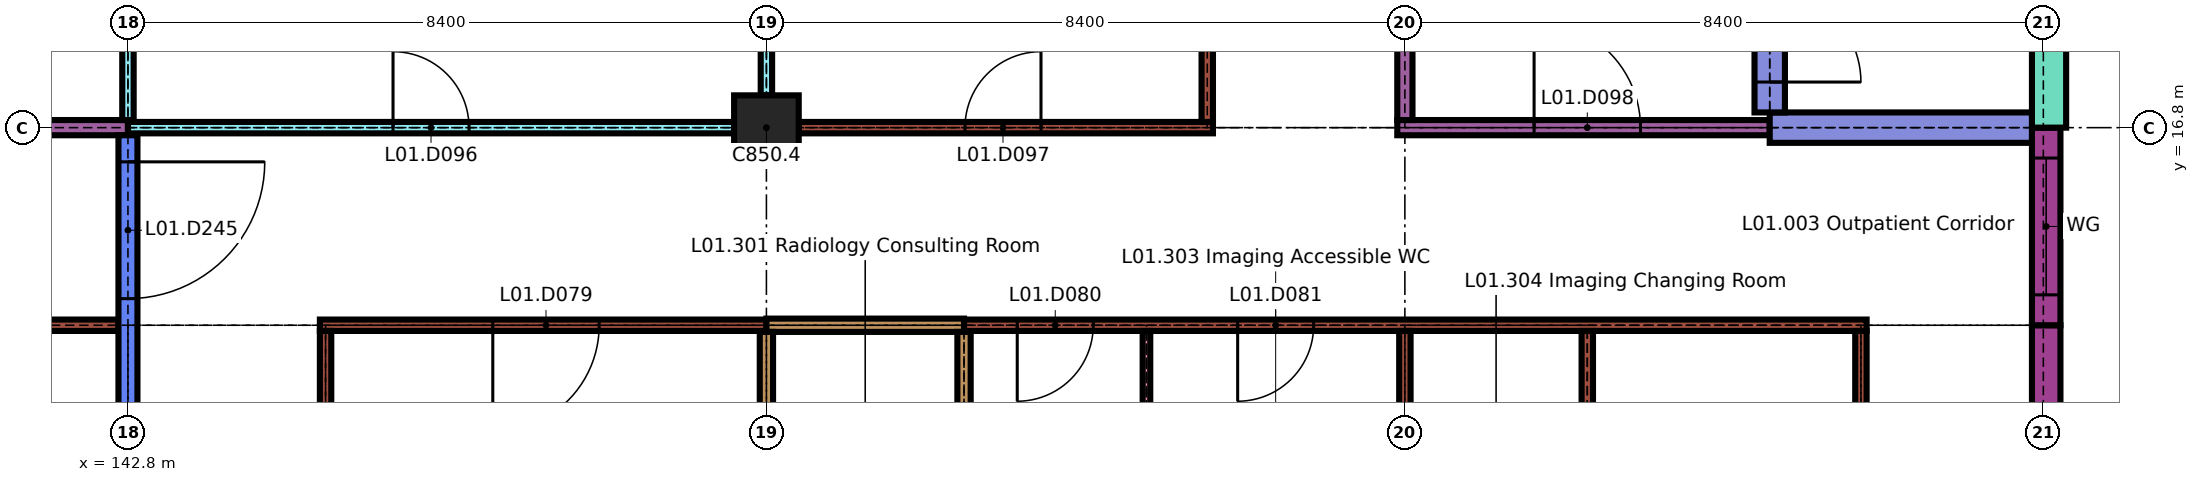
"""IFC4 building model, lengths in metres.
Left out: names, types, materials, properties, quantities, classifications, styles, units other than length and angle.
Written with IfcOpenShell. Run it as: python <this file> out.ifc"""

import sys

from ifc_helpers import new_model, si_unit, direction, frame, frame_2d, origin, origin_2d, place, context, subcontext, project, spatial, rectangle, extrude, element, fill, save


model = new_model("IFC4")
c1 = context("Model", 3, precision=1e-05, world=origin(), true_north=direction((0.0, 1.0)))
c2 = subcontext(c1, "Body", "Model", "MODEL_VIEW")
j1 = project(units=[si_unit("LENGTHUNIT", "METRE"), si_unit("PLANEANGLEUNIT", "RADIAN")], contexts=[c1])
p1 = place(None, origin())
s1 = spatial("IfcSite", under=j1, at=p1, CompositionType="ELEMENT")
p2 = place(p1, origin())
s2 = spatial("IfcBuilding", under=s1, at=p2, CompositionType="ELEMENT")
p3 = place(p2, frame((0.0, 0.0, 4.5)))
s3 = spatial("IfcBuildingStorey", under=s2, at=p3, CompositionType="ELEMENT", Elevation=4.5)
p4 = place(p3, frame((151.2, 16.8, 0.0), z_axis=(0.0, 0.0, 1.0), x_axis=(1.0, 0.0, 0.0)))
e1 = element("IfcColumn", 1, at=p4, inside=s3, PredefinedType="COLUMN", context=c2, shape_type="SweptSolid", body=[
    extrude(rectangle(XDim=0.85, YDim=0.85, at=origin_2d()), origin(), (0.0, 0.0, 1.0), 3.45),
])
p5 = place(p3, frame((168.038, 12.8, 0.0), z_axis=(0.0, 0.0, 1.0), x_axis=(0.0, 1.0, 0.0)))
e2 = element("IfcWall", 2, at=p5, inside=s3, PredefinedType="SOLIDWALL", context=c2, shape_type="SweptSolid", body=[
    extrude(rectangle(XDim=1.4, YDim=0.375, at=frame_2d((0.7, 0.0))), origin(), (0.0, 0.0, 1.0), 3.15),
])
p6 = place(p3, frame((168.038, 14.2, 0.0), z_axis=(0.0, 0.0, 1.0), x_axis=(0.0, 1.0, 0.0)))
e3 = element("IfcWall", 3, at=p6, inside=s3, PredefinedType="SOLIDWALL", context=c2, shape_type="SweptSolid", body=[
    extrude(rectangle(XDim=2.6, YDim=0.375, at=frame_2d((1.3, 0.0))), origin(), (0.0, 0.0, 1.0), 3.15),
])
p7 = place(p6, frame((0.4, 0.0, 0.9)))
e4 = element("IfcOpeningElement", 4, at=p7, cuts=e3, PredefinedType="OPENING", context=c2, shape_type="SweptSolid", body=[
    extrude(rectangle(XDim=1.8, YDim=1.5, at=frame_2d((0.9, 0.75))), frame((0.0, 0.198, 0.0), z_axis=(0.0, -1.0, 0.0), x_axis=(1.0, 0.0, 0.0)), (0.0, 0.0, 1.0), 0.395),
])
p8 = place(p3, frame((168.075, 16.8, 0.0), z_axis=(0.0, 0.0, 1.0), x_axis=(0.0, 1.0, 0.0)))
e5 = element("IfcWall", 5, at=p8, inside=s3, PredefinedType="SOLIDWALL", context=c2, shape_type="SweptSolid", body=[
    extrude(rectangle(XDim=3.15, YDim=0.45, at=frame_2d((1.575, 0.0))), origin(), (0.0, 0.0, 1.0), 3.45),
])
p9 = place(p3, frame((131.4, 14.2, 0.0), z_axis=(0.0, 0.0, 1.0), x_axis=(1.0, 0.0, 0.0)))
e6 = element("IfcWall", 6, at=p9, inside=s3, PredefinedType="PARTITIONING", context=c2, shape_type="SweptSolid", body=[
    extrude(rectangle(XDim=11.275, YDim=0.15, at=frame_2d((5.638, 0.0))), origin(), (0.0, 0.0, 1.0), 3.45),
])
p10 = place(p9, frame((1.0, 0.0, 0.0)))
e7 = element("IfcOpeningElement", 7, at=p10, cuts=e6, PredefinedType="OPENING", context=c2, shape_type="SweptSolid", body=[
    extrude(rectangle(XDim=1.0, YDim=2.1, at=frame_2d((0.5, 1.05))), frame((0.0, 0.085, 0.0), z_axis=(0.0, -1.0, 0.0), x_axis=(1.0, 0.0, 0.0)), (0.0, 0.0, 1.0), 0.17),
])
p11 = place(p9, frame((6.438, 0.0, 0.0)))
e8 = element("IfcOpeningElement", 8, at=p11, cuts=e6, PredefinedType="OPENING", context=c2, shape_type="SweptSolid", body=[
    extrude(rectangle(XDim=1.4, YDim=2.1, at=frame_2d((0.7, 1.05))), frame((0.0, 0.085, 0.0), z_axis=(0.0, -1.0, 0.0), x_axis=(1.0, 0.0, 0.0)), (0.0, 0.0, 1.0), 0.17),
])
p12 = place(p3, frame((145.325, 14.2, 0.0), z_axis=(0.0, 0.0, 1.0), x_axis=(1.0, 0.0, 0.0)))
e9 = element("IfcWall", 9, at=p12, inside=s3, PredefinedType="PARTITIONING", context=c2, shape_type="SweptSolid", body=[
    extrude(rectangle(XDim=5.875, YDim=0.15, at=frame_2d((2.938, 0.0))), origin(), (0.0, 0.0, 1.0), 3.45),
])
p13 = place(p12, frame((2.275, 0.0, 0.0)))
e10 = element("IfcOpeningElement", 10, at=p13, cuts=e9, PredefinedType="OPENING", context=c2, shape_type="SweptSolid", body=[
    extrude(rectangle(XDim=1.4, YDim=2.1, at=frame_2d((0.7, 1.05))), frame((0.0, 0.085, 0.0), z_axis=(0.0, -1.0, 0.0), x_axis=(1.0, 0.0, 0.0)), (0.0, 0.0, 1.0), 0.17),
])
p14 = place(p3, frame((151.2, 14.2, 0.0), z_axis=(0.0, 0.0, 1.0), x_axis=(1.0, 0.0, 0.0)))
e11 = element("IfcWall", 11, at=p14, inside=s3, PredefinedType="PARTITIONING", context=c2, shape_type="SweptSolid", body=[
    extrude(rectangle(XDim=2.6, YDim=0.175, at=frame_2d((1.3, 0.0))), origin(), (0.0, 0.0, 1.0), 3.45),
])
p15 = place(p3, frame((153.8, 14.2, 0.0), z_axis=(0.0, 0.0, 1.0), x_axis=(1.0, 0.0, 0.0)))
e12 = element("IfcWall", 12, at=p15, inside=s3, PredefinedType="PARTITIONING", context=c2, shape_type="SweptSolid", body=[
    extrude(rectangle(XDim=11.875, YDim=0.15, at=frame_2d((5.938, 0.0))), origin(), (0.0, 0.0, 1.0), 3.45),
])
p16 = place(p15, frame((0.7, 0.0, 0.0)))
e13 = element("IfcOpeningElement", 13, at=p16, cuts=e12, PredefinedType="OPENING", context=c2, shape_type="SweptSolid", body=[
    extrude(rectangle(XDim=1.0, YDim=2.1, at=frame_2d((0.5, 1.05))), frame((0.0, 0.085, 0.0), z_axis=(0.0, -1.0, 0.0), x_axis=(1.0, 0.0, 0.0)), (0.0, 0.0, 1.0), 0.17),
])
p17 = place(p15, frame((3.6, 0.0, 0.0)))
e14 = element("IfcOpeningElement", 14, at=p17, cuts=e12, PredefinedType="OPENING", context=c2, shape_type="SweptSolid", body=[
    extrude(rectangle(XDim=1.0, YDim=2.1, at=frame_2d((0.5, 1.05))), frame((0.0, 0.085, 0.0), z_axis=(0.0, -1.0, 0.0), x_axis=(1.0, 0.0, 0.0)), (0.0, 0.0, 1.0), 0.17),
])
p18 = place(p3, frame((117.6, 16.8, 0.0), z_axis=(0.0, 0.0, 1.0), x_axis=(1.0, 0.0, 0.0)))
e15 = element("IfcWall", 15, at=p18, inside=s3, PredefinedType="PARTITIONING", context=c2, shape_type="SweptSolid", body=[
    extrude(rectangle(XDim=25.2, YDim=0.2, at=frame_2d((12.6, 0.0))), origin(), (0.0, 0.0, 1.0), 3.45),
])
p19 = place(p18, frame((3.3, 0.0, 0.0)))
e16 = element("IfcOpeningElement", 16, at=p19, cuts=e15, PredefinedType="OPENING", context=c2, shape_type="SweptSolid", body=[
    extrude(rectangle(XDim=1.8, YDim=2.4, at=frame_2d((0.9, 1.2))), frame((0.0, 0.11, 0.0), z_axis=(0.0, -1.0, 0.0), x_axis=(1.0, 0.0, 0.0)), (0.0, 0.0, 1.0), 0.22),
])
p20 = place(p18, frame((15.9, 0.0, 0.0)))
e17 = element("IfcOpeningElement", 17, at=p20, cuts=e15, PredefinedType="OPENING", context=c2, shape_type="SweptSolid", body=[
    extrude(rectangle(XDim=1.8, YDim=2.4, at=frame_2d((0.9, 1.2))), frame((0.0, 0.11, 0.0), z_axis=(0.0, -1.0, 0.0), x_axis=(1.0, 0.0, 0.0)), (0.0, 0.0, 1.0), 0.22),
])
p21 = place(p3, frame((142.8, 16.8, 0.0), z_axis=(0.0, 0.0, 1.0), x_axis=(1.0, 0.0, 0.0)))
e18 = element("IfcWall", 18, at=p21, inside=s3, PredefinedType="PARTITIONING", context=c2, shape_type="SweptSolid", body=[
    extrude(rectangle(XDim=7.975, YDim=0.15, at=frame_2d((3.987, 0.0))), origin(), (0.0, 0.0, 1.0), 3.45),
])
p22 = place(p21, frame((3.488, 0.0, 0.0)))
e19 = element("IfcOpeningElement", 19, at=p22, cuts=e18, PredefinedType="OPENING", context=c2, shape_type="SweptSolid", body=[
    extrude(rectangle(XDim=1.0, YDim=2.1, at=frame_2d((0.5, 1.05))), frame((0.0, 0.085, 0.0), z_axis=(0.0, -1.0, 0.0), x_axis=(1.0, 0.0, 0.0)), (0.0, 0.0, 1.0), 0.17),
])
p23 = place(p3, frame((151.625, 16.8, 0.0), z_axis=(0.0, 0.0, 1.0), x_axis=(1.0, 0.0, 0.0)))
e20 = element("IfcWall", 20, at=p23, inside=s3, PredefinedType="PARTITIONING", context=c2, shape_type="SweptSolid", body=[
    extrude(rectangle(XDim=5.45, YDim=0.15, at=frame_2d((2.725, 0.0))), origin(), (0.0, 0.0, 1.0), 3.45),
])
p24 = place(p23, frame((2.188, 0.0, 0.0)))
e21 = element("IfcOpeningElement", 21, at=p24, cuts=e20, PredefinedType="OPENING", context=c2, shape_type="SweptSolid", body=[
    extrude(rectangle(XDim=1.0, YDim=2.1, at=frame_2d((0.5, 1.05))), frame((0.0, 0.085, 0.0), z_axis=(0.0, -1.0, 0.0), x_axis=(1.0, 0.0, 0.0)), (0.0, 0.0, 1.0), 0.17),
])
p25 = place(p3, frame((159.5, 16.8, 0.0), z_axis=(0.0, 0.0, 1.0), x_axis=(1.0, 0.0, 0.0)))
e22 = element("IfcWall", 22, at=p25, inside=s3, PredefinedType="PARTITIONING", context=c2, shape_type="SweptSolid", body=[
    extrude(rectangle(XDim=4.9, YDim=0.2, at=frame_2d((2.45, 0.0))), origin(), (0.0, 0.0, 1.0), 3.45),
])
p26 = place(p25, frame((1.8, 0.0, 0.0)))
e23 = element("IfcOpeningElement", 23, at=p26, cuts=e22, PredefinedType="OPENING", context=c2, shape_type="SweptSolid", body=[
    extrude(rectangle(XDim=1.4, YDim=2.1, at=frame_2d((0.7, 1.05))), frame((0.0, 0.11, 0.0), z_axis=(0.0, -1.0, 0.0), x_axis=(1.0, 0.0, 0.0)), (0.0, 0.0, 1.0), 0.22),
])
p27 = place(p3, frame((164.4, 16.8, 0.0), z_axis=(0.0, 0.0, 1.0), x_axis=(1.0, 0.0, 0.0)))
e24 = element("IfcWall", 24, at=p27, inside=s3, PredefinedType="SHEAR", context=c2, shape_type="SweptSolid", body=[
    extrude(rectangle(XDim=3.45, YDim=0.4, at=frame_2d((1.725, 0.0))), origin(), (0.0, 0.0, 1.0), 3.45),
])
p28 = place(p3, frame((142.8, 6.0, 0.0), z_axis=(0.0, 0.0, 1.0), x_axis=(0.0, 1.0, 0.0)))
e25 = element("IfcWall", 25, at=p28, inside=s3, PredefinedType="SOLIDWALL", context=c2, shape_type="SweptSolid", body=[
    extrude(rectangle(XDim=10.7, YDim=0.25, at=frame_2d((5.35, 0.0))), origin(), (0.0, 0.0, 1.0), 3.45),
])
p29 = place(p28, frame((0.5, 0.0, 0.0)))
e26 = element("IfcOpeningElement", 26, at=p29, cuts=e25, PredefinedType="OPENING", context=c2, shape_type="SweptSolid", body=[
    extrude(rectangle(XDim=1.4, YDim=2.1, at=frame_2d((0.7, 1.05))), frame((0.0, 0.135, 0.0), z_axis=(0.0, -1.0, 0.0), x_axis=(1.0, 0.0, 0.0)), (0.0, 0.0, 1.0), 0.27),
])
p30 = place(p28, frame((8.55, 0.0, 0.0)))
e27 = element("IfcOpeningElement", 27, at=p30, cuts=e25, PredefinedType="OPENING", context=c2, shape_type="SweptSolid", body=[
    extrude(rectangle(XDim=1.8, YDim=2.4, at=frame_2d((0.9, 1.2))), frame((0.0, 0.135, 0.0), z_axis=(0.0, -1.0, 0.0), x_axis=(1.0, 0.0, 0.0)), (0.0, 0.0, 1.0), 0.27),
])
p31 = place(p3, frame((142.8, 16.9, 0.0), z_axis=(0.0, 0.0, 1.0), x_axis=(0.0, 1.0, 0.0)))
e28 = element("IfcWall", 28, at=p31, inside=s3, PredefinedType="PARTITIONING", context=c2, shape_type="SweptSolid", body=[
    extrude(rectangle(XDim=4.7, YDim=0.15, at=frame_2d((2.35, 0.0))), origin(), (0.0, 0.0, 1.0), 3.45),
])
p32 = place(p3, frame((145.4, 8.675, 0.0), z_axis=(0.0, 0.0, 1.0), x_axis=(0.0, 1.0, 0.0)))
e29 = element("IfcWall", 29, at=p32, inside=s3, PredefinedType="PARTITIONING", context=c2, shape_type="SweptSolid", body=[
    extrude(rectangle(XDim=5.45, YDim=0.15, at=frame_2d((2.725, 0.0))), origin(), (0.0, 0.0, 1.0), 3.45),
])
p33 = place(p3, frame((151.2, 8.825, 0.0), z_axis=(0.0, 0.0, 1.0), x_axis=(0.0, 1.0, 0.0)))
e30 = element("IfcWall", 30, at=p33, inside=s3, PredefinedType="PARTITIONING", context=c2, shape_type="SweptSolid", body=[
    extrude(rectangle(XDim=5.288, YDim=0.175, at=frame_2d((2.644, 0.0))), origin(), (0.0, 0.0, 1.0), 3.45),
])
p34 = place(p3, frame((151.2, 17.225, 0.0), z_axis=(0.0, 0.0, 1.0), x_axis=(0.0, 1.0, 0.0)))
e31 = element("IfcWall", 31, at=p34, inside=s3, PredefinedType="PARTITIONING", context=c2, shape_type="SweptSolid", body=[
    extrude(rectangle(XDim=7.55, YDim=0.15, at=frame_2d((3.775, 0.0))), origin(), (0.0, 0.0, 1.0), 3.45),
])
p35 = place(p3, frame((153.8, 8.688, 0.0), z_axis=(0.0, 0.0, 1.0), x_axis=(0.0, 1.0, 0.0)))
e32 = element("IfcWall", 32, at=p35, inside=s3, PredefinedType="PARTITIONING", context=c2, shape_type="SweptSolid", body=[
    extrude(rectangle(XDim=5.425, YDim=0.175, at=frame_2d((2.712, 0.0))), origin(), (0.0, 0.0, 1.0), 3.45),
])
p36 = place(p3, frame((156.2, 8.675, 0.0), z_axis=(0.0, 0.0, 1.0), x_axis=(0.0, 1.0, 0.0)))
e33 = element("IfcWall", 33, at=p36, inside=s3, PredefinedType="PARTITIONING", context=c2, shape_type="SweptSolid", body=[
    extrude(rectangle(XDim=5.45, YDim=0.1, at=frame_2d((2.725, 0.0))), origin(), (0.0, 0.0, 1.0), 3.45),
])
p37 = place(p3, frame((157.0, 16.875, 0.0), z_axis=(0.0, 0.0, 1.0), x_axis=(0.0, 1.0, 0.0)))
e34 = element("IfcWall", 34, at=p37, inside=s3, PredefinedType="PARTITIONING", context=c2, shape_type="SweptSolid", body=[
    extrude(rectangle(XDim=8.25, YDim=0.15, at=frame_2d((4.125, 0.0))), origin(), (0.0, 0.0, 1.0), 3.45),
])
p38 = place(p3, frame((159.6, 8.825, 0.0), z_axis=(0.0, 0.0, 1.0), x_axis=(0.0, 1.0, 0.0)))
e35 = element("IfcWall", 35, at=p38, inside=s3, PredefinedType="PARTITIONING", context=c2, shape_type="SweptSolid", body=[
    extrude(rectangle(XDim=5.3, YDim=0.15, at=frame_2d((2.65, 0.0))), origin(), (0.0, 0.0, 1.0), 3.45),
])
p39 = place(p3, frame((159.6, 16.9, 0.0), z_axis=(0.0, 0.0, 1.0), x_axis=(0.0, 1.0, 0.0)))
e36 = element("IfcWall", 36, at=p39, inside=s3, PredefinedType="PARTITIONING", context=c2, shape_type="SweptSolid", body=[
    extrude(rectangle(XDim=8.2, YDim=0.2, at=frame_2d((4.1, 0.0))), origin(), (0.0, 0.0, 1.0), 3.45),
])
p40 = place(p39, frame((3.4, 0.0, 0.0)))
e37 = element("IfcOpeningElement", 37, at=p40, cuts=e36, PredefinedType="OPENING", context=c2, shape_type="SweptSolid", body=[
    extrude(rectangle(XDim=1.4, YDim=2.1, at=frame_2d((0.7, 1.05))), frame((0.0, 0.11, 0.0), z_axis=(0.0, -1.0, 0.0), x_axis=(1.0, 0.0, 0.0)), (0.0, 0.0, 1.0), 0.22),
])
p41 = place(p3, frame((162.0, 8.675, 0.0), z_axis=(0.0, 0.0, 1.0), x_axis=(0.0, 1.0, 0.0)))
e38 = element("IfcWall", 38, at=p41, inside=s3, PredefinedType="PARTITIONING", context=c2, shape_type="SweptSolid", body=[
    extrude(rectangle(XDim=5.45, YDim=0.15, at=frame_2d((2.725, 0.0))), origin(), (0.0, 0.0, 1.0), 3.45),
])
p42 = place(p3, frame((164.4, 17.0, 0.0), z_axis=(0.0, 0.0, 1.0), x_axis=(0.0, 1.0, 0.0)))
e39 = element("IfcWall", 39, at=p42, inside=s3, PredefinedType="SHEAR", context=c2, shape_type="SweptSolid", body=[
    extrude(rectangle(XDim=8.0, YDim=0.4, at=frame_2d((4.0, 0.0))), origin(), (0.0, 0.0, 1.0), 3.45),
])
p43 = place(p42, frame((0.4, 0.0, 0.0)))
e40 = element("IfcOpeningElement", 40, at=p43, cuts=e39, PredefinedType="OPENING", context=c2, shape_type="SweptSolid", body=[
    extrude(rectangle(XDim=1.2, YDim=2.1, at=frame_2d((0.6, 1.05))), frame((0.0, 0.21, 0.0), z_axis=(0.0, -1.0, 0.0), x_axis=(1.0, 0.0, 0.0)), (0.0, 0.0, 1.0), 0.42),
])
p44 = place(p3, frame((165.6, 8.675, 0.0), z_axis=(0.0, 0.0, 1.0), x_axis=(0.0, 1.0, 0.0)))
e41 = element("IfcWall", 41, at=p44, inside=s3, PredefinedType="PARTITIONING", context=c2, shape_type="SweptSolid", body=[
    extrude(rectangle(XDim=5.45, YDim=0.15, at=frame_2d((2.725, 0.0))), origin(), (0.0, 0.0, 1.0), 3.45),
])
p45 = place(p7, origin())
e42 = element("IfcWindow", 42, at=p45, inside=s3, PartitioningType="DOUBLE_PANEL_VERTICAL", PredefinedType="WINDOW", context=c2, shape_type="SweptSolid", body=[
    extrude(rectangle(XDim=1.8, YDim=1.5, at=frame_2d((0.9, 0.75))), frame((0.0, 0.03, 0.0), z_axis=(0.0, -1.0, 0.0), x_axis=(1.0, 0.0, 0.0)), (0.0, 0.0, 1.0), 0.06),
])
fill(e4, e42)
p46 = place(p13, origin())
e43 = element("IfcDoor", 43, at=p46, inside=s3, OperationType="SINGLE_SWING_LEFT", PredefinedType="DOOR", context=c2, shape_type="SweptSolid", body=[
    extrude(rectangle(XDim=1.4, YDim=2.1, at=frame_2d((0.7, 1.05))), frame((0.0, 0.025, 0.0), z_axis=(0.0, -1.0, 0.0), x_axis=(1.0, 0.0, 0.0)), (0.0, 0.0, 1.0), 0.05),
])
fill(e10, e43)
p47 = place(p16, origin())
e44 = element("IfcDoor", 44, at=p47, inside=s3, OperationType="SINGLE_SWING_LEFT", PredefinedType="DOOR", context=c2, shape_type="SweptSolid", body=[
    extrude(rectangle(XDim=1.0, YDim=2.1, at=frame_2d((0.5, 1.05))), frame((0.0, 0.025, 0.0), z_axis=(0.0, -1.0, 0.0), x_axis=(1.0, 0.0, 0.0)), (0.0, 0.0, 1.0), 0.05),
])
fill(e13, e44)
p48 = place(p17, origin())
e45 = element("IfcDoor", 45, at=p48, inside=s3, OperationType="SINGLE_SWING_LEFT", PredefinedType="DOOR", context=c2, shape_type="SweptSolid", body=[
    extrude(rectangle(XDim=1.0, YDim=2.1, at=frame_2d((0.5, 1.05))), frame((0.0, 0.025, 0.0), z_axis=(0.0, -1.0, 0.0), x_axis=(1.0, 0.0, 0.0)), (0.0, 0.0, 1.0), 0.05),
])
fill(e14, e45)
p49 = place(p22, origin())
e46 = element("IfcDoor", 46, at=p49, inside=s3, OperationType="SINGLE_SWING_RIGHT", PredefinedType="DOOR", context=c2, shape_type="SweptSolid", body=[
    extrude(rectangle(XDim=1.0, YDim=2.1, at=frame_2d((0.5, 1.05))), frame((0.0, 0.04, 0.0), z_axis=(0.0, -1.0, 0.0), x_axis=(1.0, 0.0, 0.0)), (0.0, 0.0, 1.0), 0.08),
])
fill(e19, e46)
p50 = place(p24, origin())
e47 = element("IfcDoor", 47, at=p50, inside=s3, OperationType="SINGLE_SWING_LEFT", PredefinedType="DOOR", context=c2, shape_type="SweptSolid", body=[
    extrude(rectangle(XDim=1.0, YDim=2.1, at=frame_2d((0.5, 1.05))), frame((0.0, 0.025, 0.0), z_axis=(0.0, -1.0, 0.0), x_axis=(1.0, 0.0, 0.0)), (0.0, 0.0, 1.0), 0.05),
])
fill(e21, e47)
p51 = place(p26, origin())
e48 = element("IfcDoor", 48, at=p51, inside=s3, OperationType="SINGLE_SWING_RIGHT", PredefinedType="DOOR", context=c2, shape_type="SweptSolid", body=[
    extrude(rectangle(XDim=1.4, YDim=2.1, at=frame_2d((0.7, 1.05))), frame((0.0, 0.03, 0.0), z_axis=(0.0, -1.0, 0.0), x_axis=(1.0, 0.0, 0.0)), (0.0, 0.0, 1.0), 0.06),
])
fill(e23, e48)
p52 = place(p30, origin())
e49 = element("IfcDoor", 49, at=p52, inside=s3, OperationType="SINGLE_SWING_RIGHT", PredefinedType="DOOR", context=c2, shape_type="SweptSolid", body=[
    extrude(rectangle(XDim=1.8, YDim=2.4, at=frame_2d((0.9, 1.2))), frame((0.0, 0.03, 0.0), z_axis=(0.0, -1.0, 0.0), x_axis=(1.0, 0.0, 0.0)), (0.0, 0.0, 1.0), 0.06),
])
fill(e27, e49)
p53 = place(p43, origin())
e50 = element("IfcDoor", 50, at=p53, inside=s3, OperationType="SINGLE_SWING_LEFT", PredefinedType="DOOR", context=c2, shape_type="SweptSolid", body=[
    extrude(rectangle(XDim=1.2, YDim=2.1, at=frame_2d((0.6, 1.05))), frame((0.0, 0.025, 0.0), z_axis=(0.0, -1.0, 0.0), x_axis=(1.0, 0.0, 0.0)), (0.0, 0.0, 1.0), 0.05),
])
fill(e40, e50)
save(model, sys.argv[1])
